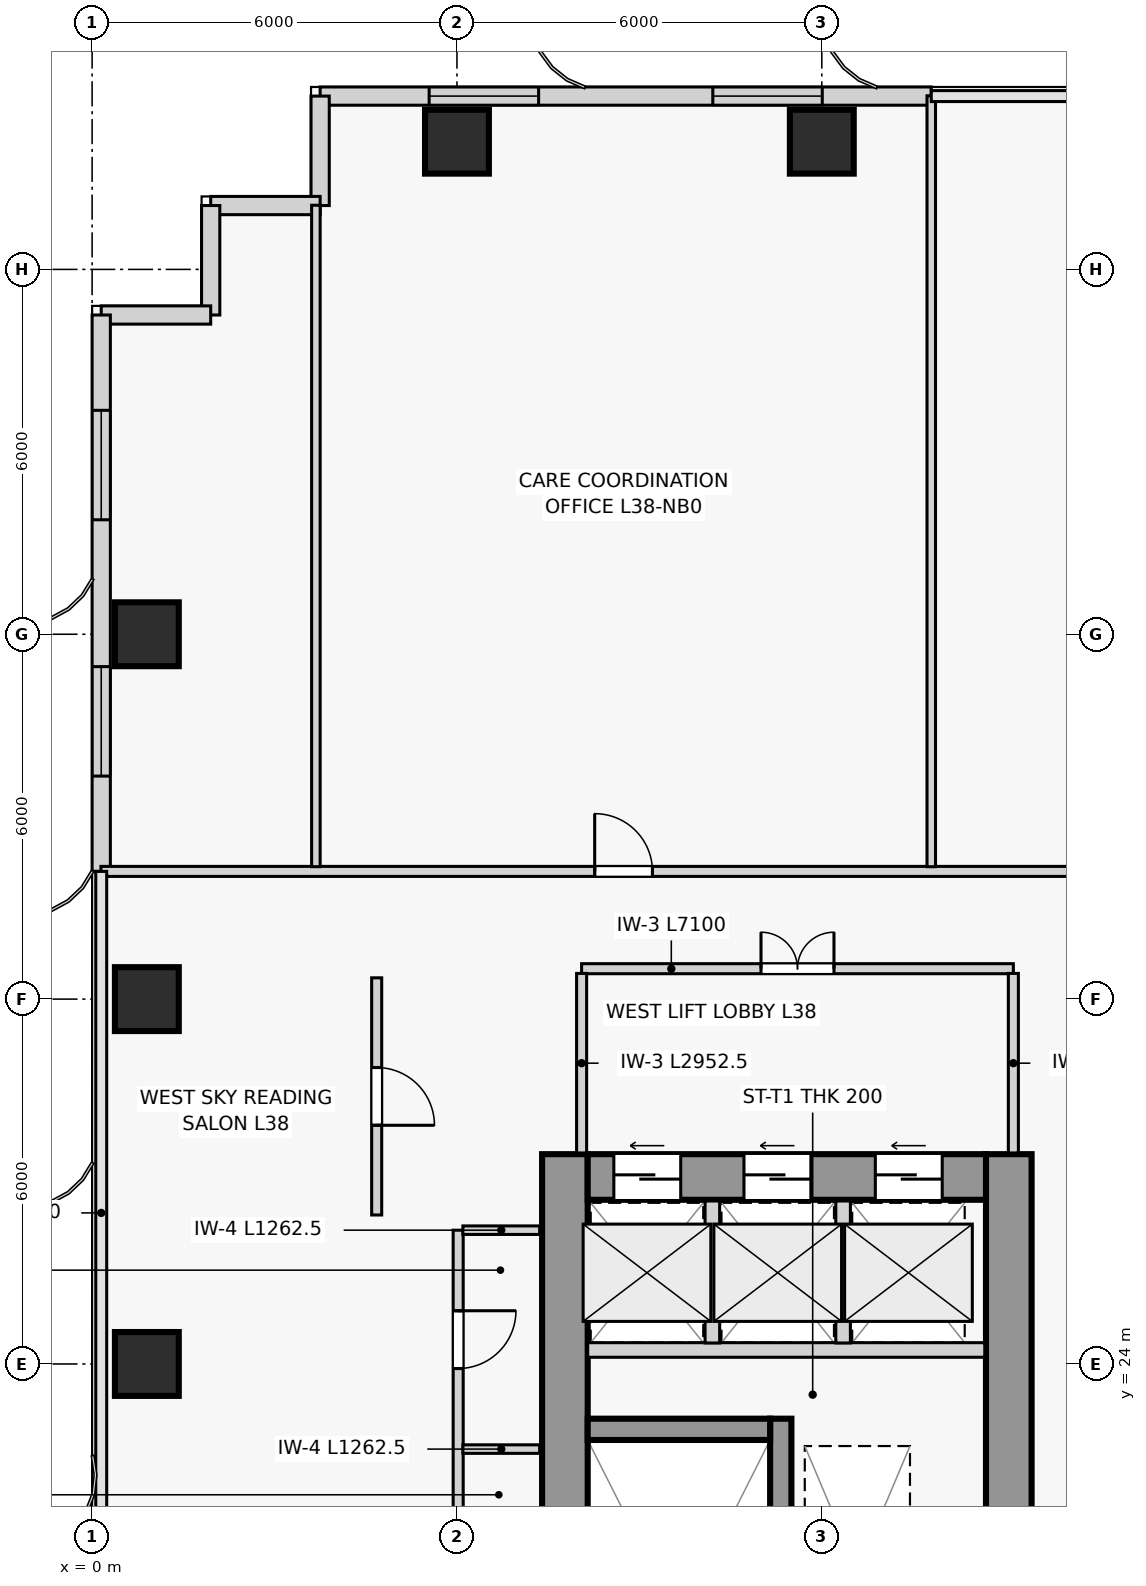
"""IFC4 building model, lengths in metres.
Left out: names, types, materials, properties, quantities, classifications, styles, units other than length and angle.
Written with IfcOpenShell. Run it as: python <this file> out.ifc"""

import sys

from ifc_helpers import new_model, si_unit, direction, frame, frame_2d, origin, origin_2d, place, context, subcontext, project, spatial, rectangle, extrude, source, transform, mapped, element, fill, save


model = new_model("IFC4")
c1 = context("Model", 3, precision=1e-05, world=origin(), true_north=direction((0.0, 1.0)))
c2 = subcontext(c1, "Body", "Model", "MODEL_VIEW")
j1 = project(units=[si_unit("LENGTHUNIT", "METRE"), si_unit("PLANEANGLEUNIT", "RADIAN")], contexts=[c1])
p1 = place(None, origin())
s1 = spatial("IfcSite", under=j1, at=p1, CompositionType="ELEMENT")
p2 = place(p1, origin())
s2 = spatial("IfcBuilding", under=s1, at=p2, CompositionType="ELEMENT")
p3 = place(p2, frame((0.0, 0.0, 144.9)))
s3 = spatial("IfcBuildingStorey", under=s2, at=p3, CompositionType="ELEMENT", Elevation=144.9)
p4 = place(p3, frame((7.775, 14.6, 0.0), z_axis=(0.0, 0.0, 1.0), x_axis=(0.0, 1.0, 0.0)))
e1 = element("IfcWall", 1, at=p4, inside=s3, PredefinedType="SHEAR", context=c2, shape_type="SweptSolid", body=[
    extrude(rectangle(XDim=12.85, YDim=0.75, at=frame_2d((6.425, 0.0))), origin(), (0.0, 0.0, 1.0), 3.6),
])
p5 = place(p3, frame((15.075, 14.6, 0.0), z_axis=(0.0, 0.0, 1.0), x_axis=(0.0, 1.0, 0.0)))
e2 = element("IfcWall", 2, at=p5, inside=s3, PredefinedType="SHEAR", context=c2, shape_type="SweptSolid", body=[
    extrude(rectangle(XDim=12.85, YDim=0.75, at=frame_2d((6.425, 0.0))), origin(), (0.0, 0.0, 1.0), 3.6),
])
p6 = place(p5, frame((5.5, 0.0, 0.0)))
e3 = element("IfcOpeningElement", 3, at=p6, cuts=e2, PredefinedType="OPENING", context=c2, shape_type="SweptSolid", body=[
    extrude(rectangle(XDim=1.1, YDim=2.2, at=frame_2d((0.55, 1.1))), frame((0.0, 0.385, 0.0), z_axis=(0.0, -1.0, 0.0), x_axis=(1.0, 0.0, 0.0)), (0.0, 0.0, 1.0), 0.77),
])
p7 = place(p3, frame((8.15, 27.075, 0.0), z_axis=(0.0, 0.0, 1.0), x_axis=(1.0, 0.0, 0.0)))
e4 = element("IfcWall", 4, at=p7, inside=s3, PredefinedType="SHEAR", context=c2, shape_type="SweptSolid", body=[
    extrude(rectangle(XDim=6.55, YDim=0.75, at=frame_2d((3.275, 0.0))), origin(), (0.0, 0.0, 1.0), 3.6),
])
p8 = place(p7, frame((0.43, 0.0, 0.0)))
e5 = element("IfcOpeningElement", 5, at=p8, cuts=e4, PredefinedType="OPENING", context=c2, shape_type="SweptSolid", body=[
    extrude(rectangle(XDim=1.1, YDim=2.2, at=frame_2d((0.55, 1.1))), frame((0.0, 0.385, 0.0), z_axis=(0.0, -1.0, 0.0), x_axis=(1.0, 0.0, 0.0)), (0.0, 0.0, 1.0), 0.77),
])
p9 = place(p7, frame((2.57, 0.0, 0.0)))
e6 = element("IfcOpeningElement", 6, at=p9, cuts=e4, PredefinedType="OPENING", context=c2, shape_type="SweptSolid", body=[
    extrude(rectangle(XDim=1.1, YDim=2.2, at=frame_2d((0.55, 1.1))), frame((0.0, 0.385, 0.0), z_axis=(0.0, -1.0, 0.0), x_axis=(1.0, 0.0, 0.0)), (0.0, 0.0, 1.0), 0.77),
])
p10 = place(p7, frame((4.73, 0.0, 0.0)))
e7 = element("IfcOpeningElement", 7, at=p10, cuts=e4, PredefinedType="OPENING", context=c2, shape_type="SweptSolid", body=[
    extrude(rectangle(XDim=1.1, YDim=2.2, at=frame_2d((0.55, 1.1))), frame((0.0, 0.385, 0.0), z_axis=(0.0, -1.0, 0.0), x_axis=(1.0, 0.0, 0.0)), (0.0, 0.0, 1.0), 0.77),
])
p11 = place(p3, frame((11.325, 15.35, 0.0), z_axis=(0.0, 0.0, 1.0), x_axis=(0.0, 1.0, 0.0)))
e8 = element("IfcWall", 8, at=p11, inside=s3, PredefinedType="SHEAR", context=c2, shape_type="SweptSolid", body=[
    extrude(rectangle(XDim=7.75, YDim=0.35, at=frame_2d((3.875, 0.0))), origin(), (0.0, 0.0, 1.0), 3.6),
])
p12 = place(p3, frame((8.15, 22.925, 0.0), z_axis=(0.0, 0.0, 1.0), x_axis=(1.0, 0.0, 0.0)))
e9 = element("IfcWall", 9, at=p12, inside=s3, PredefinedType="SHEAR", context=c2, shape_type="SweptSolid", body=[
    extrude(rectangle(XDim=3.0, YDim=0.35, at=frame_2d((1.5, 0.0))), origin(), (0.0, 0.0, 1.0), 3.6),
])
m1 = source(origin(), c2, "Body", "SweptSolid", [
    extrude(rectangle(XDim=1.05, YDim=1.05, at=origin_2d()), origin(), (0.0, 0.0, 1.0), 3.6),
])
for number, where, z_axis, x_axis in (
    (10, (6.0, 44.1, 0.0), (0.0, 0.0, 1.0), (1.0, 0.0, 0.0)),
    (11, (12.0, 44.1, 0.0), (0.0, 0.0, 1.0), (1.0, 0.0, 0.0)),
    (12, (0.9, 24.0, 0.0), (0.0, 0.0, 1.0), (1.0, 0.0, 0.0)),
    (13, (0.9, 30.0, 0.0), (0.0, 0.0, 1.0), (1.0, 0.0, 0.0)),
    (14, (0.9, 36.0, 0.0), (0.0, 0.0, 1.0), (1.0, 0.0, 0.0)),
):
    element("IfcColumn", number, at=place(p3, frame(where, z_axis=z_axis, x_axis=x_axis)), inside=s3, PredefinedType="COLUMN", context=c2, shape_type="MappedRepresentation", body=[
        mapped(m1, transform((0.0, 0.0, 0.0), scale=1.0)),
    ])
p13 = place(p3, frame((13.8, 44.85, 0.0), z_axis=(0.0, 0.0, 1.0), x_axis=(-1.0, 0.0, 0.0)))
e15 = element("IfcWall", 15, at=p13, inside=s3, PredefinedType="SOLIDWALL", context=c2, shape_type="SweptSolid", body=[
    extrude(rectangle(XDim=10.05, YDim=0.3, at=frame_2d((5.025, 0.0))), origin(), (0.0, 0.0, 1.0), 3.28),
])
p14 = place(p13, frame((1.792, 0.0, 0.8)))
e16 = element("IfcOpeningElement", 16, at=p14, cuts=e15, PredefinedType="OPENING", context=c2, shape_type="SweptSolid", body=[
    extrude(rectangle(XDim=1.8, YDim=2.1, at=frame_2d((0.9, 1.05))), frame((0.0, 0.16, 0.0), z_axis=(0.0, -1.0, 0.0), x_axis=(1.0, 0.0, 0.0)), (0.0, 0.0, 1.0), 0.32),
])
p15 = place(p13, frame((6.458, 0.0, 0.8)))
e17 = element("IfcOpeningElement", 17, at=p15, cuts=e15, PredefinedType="OPENING", context=c2, shape_type="SweptSolid", body=[
    extrude(rectangle(XDim=1.8, YDim=2.1, at=frame_2d((0.9, 1.05))), frame((0.0, 0.16, 0.0), z_axis=(0.0, -1.0, 0.0), x_axis=(1.0, 0.0, 0.0)), (0.0, 0.0, 1.0), 0.32),
])
for number, where, z_axis, x_axis in (
    (18, (3.75, 44.85, 0.0), (0.0, 0.0, 1.0), (0.0, -1.0, 0.0)),
    (19, (3.75, 43.05, 0.0), (0.0, 0.0, 1.0), (-1.0, 0.0, 0.0)),
    (20, (1.95, 43.05, 0.0), (0.0, 0.0, 1.0), (0.0, -1.0, 0.0)),
    (21, (1.95, 41.25, 0.0), (0.0, 0.0, 1.0), (-1.0, 0.0, 0.0)),
):
    element("IfcWall", number, at=place(p3, frame(where, z_axis=z_axis, x_axis=x_axis)), inside=s3, PredefinedType="SOLIDWALL", context=c2, shape_type="SweptSolid", body=[
        extrude(rectangle(XDim=1.8, YDim=0.3, at=frame_2d((0.9, 0.0))), origin(), (0.0, 0.0, 1.0), 3.28),
    ])
p16 = place(p3, frame((0.15, 41.25, 0.0), z_axis=(0.0, 0.0, 1.0), x_axis=(0.0, -1.0, 0.0)))
e22 = element("IfcWall", 22, at=p16, inside=s3, PredefinedType="SOLIDWALL", context=c2, shape_type="SweptSolid", body=[
    extrude(rectangle(XDim=9.15, YDim=0.3, at=frame_2d((4.575, 0.0))), origin(), (0.0, 0.0, 1.0), 3.28),
])
p17 = place(p16, frame((1.567, 0.0, 0.8)))
e23 = element("IfcOpeningElement", 23, at=p17, cuts=e22, PredefinedType="OPENING", context=c2, shape_type="SweptSolid", body=[
    extrude(rectangle(XDim=1.8, YDim=2.1, at=frame_2d((0.9, 1.05))), frame((0.0, 0.16, 0.0), z_axis=(0.0, -1.0, 0.0), x_axis=(1.0, 0.0, 0.0)), (0.0, 0.0, 1.0), 0.32),
])
p18 = place(p16, frame((5.782, 0.0, 0.8)))
e24 = element("IfcOpeningElement", 24, at=p18, cuts=e22, PredefinedType="OPENING", context=c2, shape_type="SweptSolid", body=[
    extrude(rectangle(XDim=1.8, YDim=2.1, at=frame_2d((0.9, 1.05))), frame((0.0, 0.16, 0.0), z_axis=(0.0, -1.0, 0.0), x_axis=(1.0, 0.0, 0.0)), (0.0, 0.0, 1.0), 0.32),
])
p19 = place(p3, frame((8.15, 24.23, 0.0), z_axis=(0.0, 0.0, 1.0), x_axis=(1.0, 0.0, 0.0)))
e25 = element("IfcWall", 25, at=p19, inside=s3, PredefinedType="PARTITIONING", context=c2, shape_type="SweptSolid", body=[
    extrude(rectangle(XDim=6.53, YDim=0.24, at=frame_2d((3.265, 0.0))), origin(), (0.0, 0.0, 1.0), 3.28),
])
for number, where, z_axis, x_axis in (
    (26, (10.2, 24.345, 0.0), (0.0, 0.0, 1.0), (0.0, 1.0, 0.0)),
    (27, (12.35, 24.345, 0.0), (0.0, 0.0, 1.0), (0.0, 1.0, 0.0)),
):
    element("IfcWall", number, at=place(p3, frame(where, z_axis=z_axis, x_axis=x_axis)), inside=s3, PredefinedType="PARTITIONING", context=c2, shape_type="SweptSolid", body=[
        extrude(rectangle(XDim=2.335, YDim=0.24, at=frame_2d((1.167, 0.0))), origin(), (0.0, 0.0, 1.0), 3.28),
    ])
p20 = place(p3, frame((8.05, 30.5, 0.0), z_axis=(0.0, 0.0, 1.0), x_axis=(1.0, 0.0, 0.0)))
e28 = element("IfcWall", 28, at=p20, inside=s3, PredefinedType="PARTITIONING", context=c2, shape_type="SweptSolid", body=[
    extrude(rectangle(XDim=7.1, YDim=0.165, at=frame_2d((3.55, 0.0))), origin(), (0.0, 0.0, 1.0), 3.28),
])
p21 = place(p20, frame((2.95, 0.0, 0.0)))
e29 = element("IfcOpeningElement", 29, at=p21, cuts=e28, PredefinedType="OPENING", context=c2, shape_type="SweptSolid", body=[
    extrude(rectangle(XDim=1.2, YDim=2.2, at=frame_2d((0.6, 1.1))), frame((0.0, 0.093, 0.0), z_axis=(0.0, -1.0, 0.0), x_axis=(1.0, 0.0, 0.0)), (0.0, 0.0, 1.0), 0.185),
])
for number, where, z_axis, x_axis in (
    (30, (8.05, 27.47, 0.0), (0.0, 0.0, 1.0), (0.0, 1.0, 0.0)),
    (31, (15.15, 27.47, 0.0), (0.0, 0.0, 1.0), (0.0, 1.0, 0.0)),
):
    element("IfcWall", number, at=place(p3, frame(where, z_axis=z_axis, x_axis=x_axis)), inside=s3, PredefinedType="PARTITIONING", context=c2, shape_type="SweptSolid", body=[
        extrude(rectangle(XDim=2.953, YDim=0.165, at=frame_2d((1.476, 0.0))), origin(), (0.0, 0.0, 1.0), 3.28),
    ])
p22 = place(p3, frame((6.02, 15.4, 0.0), z_axis=(0.0, 0.0, 1.0), x_axis=(0.0, 1.0, 0.0)))
e32 = element("IfcWall", 32, at=p22, inside=s3, PredefinedType="PARTITIONING", context=c2, shape_type="SweptSolid", body=[
    extrude(rectangle(XDim=10.8, YDim=0.165, at=frame_2d((5.4, 0.0))), origin(), (0.0, 0.0, 1.0), 3.28),
])
p23 = place(p22, frame((1.225, 0.0, 0.0)))
e33 = element("IfcOpeningElement", 33, at=p23, cuts=e32, PredefinedType="OPENING", context=c2, shape_type="SweptSolid", body=[
    extrude(rectangle(XDim=0.95, YDim=2.1, at=frame_2d((0.475, 1.05))), frame((0.0, 0.093, 0.0), z_axis=(0.0, -1.0, 0.0), x_axis=(1.0, 0.0, 0.0)), (0.0, 0.0, 1.0), 0.185),
])
p24 = place(p22, frame((4.85, 0.0, 0.0)))
e34 = element("IfcOpeningElement", 34, at=p24, cuts=e32, PredefinedType="OPENING", context=c2, shape_type="SweptSolid", body=[
    extrude(rectangle(XDim=0.9, YDim=2.1, at=frame_2d((0.45, 1.05))), frame((0.0, 0.093, 0.0), z_axis=(0.0, -1.0, 0.0), x_axis=(1.0, 0.0, 0.0)), (0.0, 0.0, 1.0), 0.185),
])
p25 = place(p22, frame((8.525, 0.0, 0.0)))
e35 = element("IfcOpeningElement", 35, at=p25, cuts=e32, PredefinedType="OPENING", context=c2, shape_type="SweptSolid", body=[
    extrude(rectangle(XDim=0.95, YDim=2.1, at=frame_2d((0.475, 1.05))), frame((0.0, 0.093, 0.0), z_axis=(0.0, -1.0, 0.0), x_axis=(1.0, 0.0, 0.0)), (0.0, 0.0, 1.0), 0.185),
])
for number, where, z_axis, x_axis in (
    (36, (6.097, 26.2, 0.0), (0.0, 0.0, 1.0), (1.0, 0.0, 0.0)),
    (37, (6.097, 22.6, 0.0), (0.0, 0.0, 1.0), (1.0, 0.0, 0.0)),
):
    element("IfcWall", number, at=place(p3, frame(where, z_axis=z_axis, x_axis=x_axis)), inside=s3, PredefinedType="PARTITIONING", context=c2, shape_type="SweptSolid", body=[
        extrude(rectangle(XDim=1.263, YDim=0.14, at=frame_2d((0.631, 0.0))), origin(), (0.0, 0.0, 1.0), 3.28),
    ])
p26 = place(p3, frame((0.145, 32.1, 0.0), z_axis=(0.0, 0.0, 1.0), x_axis=(1.0, 0.0, 0.0)))
e38 = element("IfcWall", 38, at=p26, inside=s3, PredefinedType="PARTITIONING", context=c2, shape_type="SweptSolid", body=[
    extrude(rectangle(XDim=44.71, YDim=0.165, at=frame_2d((22.355, 0.0))), origin(), (0.0, 0.0, 1.0), 3.28),
])
p27 = place(p26, frame((8.12, 0.0, 0.0)))
e39 = element("IfcOpeningElement", 39, at=p27, cuts=e38, PredefinedType="OPENING", context=c2, shape_type="SweptSolid", body=[
    extrude(rectangle(XDim=0.95, YDim=2.1, at=frame_2d((0.475, 1.05))), frame((0.0, 0.093, 0.0), z_axis=(0.0, -1.0, 0.0), x_axis=(1.0, 0.0, 0.0)), (0.0, 0.0, 1.0), 0.185),
])
p28 = place(p26, frame((18.48, 0.0, 0.0)))
e40 = element("IfcOpeningElement", 40, at=p28, cuts=e38, PredefinedType="OPENING", context=c2, shape_type="SweptSolid", body=[
    extrude(rectangle(XDim=0.95, YDim=2.1, at=frame_2d((0.475, 1.05))), frame((0.0, 0.093, 0.0), z_axis=(0.0, -1.0, 0.0), x_axis=(1.0, 0.0, 0.0)), (0.0, 0.0, 1.0), 0.185),
])
p29 = place(p26, frame((28.13, 0.0, 0.0)))
e41 = element("IfcOpeningElement", 41, at=p29, cuts=e38, PredefinedType="OPENING", context=c2, shape_type="SweptSolid", body=[
    extrude(rectangle(XDim=1.25, YDim=2.2, at=frame_2d((0.625, 1.1))), frame((0.0, 0.093, 0.0), z_axis=(0.0, -1.0, 0.0), x_axis=(1.0, 0.0, 0.0)), (0.0, 0.0, 1.0), 0.185),
])
p30 = place(p26, frame((36.59, 0.0, 0.0)))
e42 = element("IfcOpeningElement", 42, at=p30, cuts=e38, PredefinedType="OPENING", context=c2, shape_type="SweptSolid", body=[
    extrude(rectangle(XDim=1.25, YDim=2.2, at=frame_2d((0.625, 1.1))), frame((0.0, 0.093, 0.0), z_axis=(0.0, -1.0, 0.0), x_axis=(1.0, 0.0, 0.0)), (0.0, 0.0, 1.0), 0.185),
])
p31 = place(p3, frame((4.68, 26.45, 0.0), z_axis=(0.0, 0.0, 1.0), x_axis=(0.0, 1.0, 0.0)))
e43 = element("IfcWall", 43, at=p31, inside=s3, PredefinedType="PARTITIONING", context=c2, shape_type="SweptSolid", body=[
    extrude(rectangle(XDim=3.9, YDim=0.165, at=frame_2d((1.95, 0.0))), origin(), (0.0, 0.0, 1.0), 3.28),
])
p32 = place(p31, frame((1.475, 0.0, 0.0)))
e44 = element("IfcOpeningElement", 44, at=p32, cuts=e43, PredefinedType="OPENING", context=c2, shape_type="SweptSolid", body=[
    extrude(rectangle(XDim=0.95, YDim=2.1, at=frame_2d((0.475, 1.05))), frame((0.0, 0.093, 0.0), z_axis=(0.0, -1.0, 0.0), x_axis=(1.0, 0.0, 0.0)), (0.0, 0.0, 1.0), 0.185),
])
p33 = place(p3, frame((3.68, 32.177, 0.0), z_axis=(0.0, 0.0, 1.0), x_axis=(0.0, 1.0, 0.0)))
e45 = element("IfcWall", 45, at=p33, inside=s3, PredefinedType="PARTITIONING", context=c2, shape_type="SweptSolid", body=[
    extrude(rectangle(XDim=10.877, YDim=0.14, at=frame_2d((5.439, 0.0))), origin(), (0.0, 0.0, 1.0), 3.28),
])
p34 = place(p3, frame((13.8, 32.177, 0.0), z_axis=(0.0, 0.0, 1.0), x_axis=(0.0, 1.0, 0.0)))
e46 = element("IfcWall", 46, at=p34, inside=s3, PredefinedType="PARTITIONING", context=c2, shape_type="SweptSolid", body=[
    extrude(rectangle(XDim=12.677, YDim=0.14, at=frame_2d((6.339, 0.0))), origin(), (0.0, 0.0, 1.0), 3.28),
])
m2 = source(origin(), c2, "Body", "SweptSolid", [
    extrude(rectangle(XDim=1.8, YDim=2.1, at=frame_2d((0.9, 1.05))), frame((0.0, 0.03, 0.0), z_axis=(0.0, -1.0, 0.0), x_axis=(1.0, 0.0, 0.0)), (0.0, 0.0, 1.0), 0.06),
])
p35 = place(p14, origin())
e47 = element("IfcWindow", 47, at=p35, inside=s3, PartitioningType="SINGLE_PANEL", PredefinedType="WINDOW", context=c2, shape_type="MappedRepresentation", body=[
    mapped(m2, transform((0.0, 0.0, 0.0), scale=1.0)),
])
fill(e16, e47)
p36 = place(p15, origin())
e48 = element("IfcWindow", 48, at=p36, inside=s3, PartitioningType="SINGLE_PANEL", PredefinedType="WINDOW", context=c2, shape_type="MappedRepresentation", body=[
    mapped(m2, transform((0.0, 0.0, 0.0), scale=1.0)),
])
fill(e17, e48)
p37 = place(p17, origin())
e49 = element("IfcWindow", 49, at=p37, inside=s3, PartitioningType="SINGLE_PANEL", PredefinedType="WINDOW", context=c2, shape_type="MappedRepresentation", body=[
    mapped(m2, transform((0.0, 0.0, 0.0), scale=1.0)),
])
fill(e23, e49)
p38 = place(p18, origin())
e50 = element("IfcWindow", 50, at=p38, inside=s3, PartitioningType="SINGLE_PANEL", PredefinedType="WINDOW", context=c2, shape_type="MappedRepresentation", body=[
    mapped(m2, transform((0.0, 0.0, 0.0), scale=1.0)),
])
fill(e24, e50)
m3 = source(origin(), c2, "Body", "SweptSolid", [
    extrude(rectangle(XDim=1.1, YDim=2.2, at=frame_2d((0.55, 1.1))), frame((0.0, 0.025, 0.0), z_axis=(0.0, -1.0, 0.0), x_axis=(1.0, 0.0, 0.0)), (0.0, 0.0, 1.0), 0.05),
])
p39 = place(p8, origin())
e51 = element("IfcDoor", 51, at=p39, inside=s3, OperationType="SLIDING_TO_LEFT", PredefinedType="DOOR", context=c2, shape_type="MappedRepresentation", body=[
    mapped(m3, transform((0.0, 0.0, 0.0), scale=1.0)),
])
fill(e5, e51)
p40 = place(p9, origin())
e52 = element("IfcDoor", 52, at=p40, inside=s3, OperationType="SLIDING_TO_LEFT", PredefinedType="DOOR", context=c2, shape_type="MappedRepresentation", body=[
    mapped(m3, transform((0.0, 0.0, 0.0), scale=1.0)),
])
fill(e6, e52)
p41 = place(p10, origin())
e53 = element("IfcDoor", 53, at=p41, inside=s3, OperationType="SLIDING_TO_LEFT", PredefinedType="DOOR", context=c2, shape_type="MappedRepresentation", body=[
    mapped(m3, transform((0.0, 0.0, 0.0), scale=1.0)),
])
fill(e7, e53)
m4 = source(origin(), c2, "Body", "SweptSolid", [
    extrude(rectangle(XDim=1.2, YDim=2.2, at=frame_2d((0.6, 1.1))), frame((0.0, 0.025, 0.0), z_axis=(0.0, -1.0, 0.0), x_axis=(1.0, 0.0, 0.0)), (0.0, 0.0, 1.0), 0.05),
])
p42 = place(p21, origin())
e54 = element("IfcDoor", 54, at=p42, inside=s3, OperationType="DOUBLE_DOOR_SINGLE_SWING", PredefinedType="DOOR", context=c2, shape_type="MappedRepresentation", body=[
    mapped(m4, transform((0.0, 0.0, 0.0), scale=1.0)),
])
fill(e29, e54)
m5 = source(origin(), c2, "Body", "SweptSolid", [
    extrude(rectangle(XDim=0.95, YDim=2.1, at=frame_2d((0.475, 1.05))), frame((0.0, 0.025, 0.0), z_axis=(0.0, -1.0, 0.0), x_axis=(1.0, 0.0, 0.0)), (0.0, 0.0, 1.0), 0.05),
])
p43 = place(p25, frame((0.95, 0.0, 0.0), z_axis=(0.0, 0.0, 1.0), x_axis=(-1.0, 0.0, 0.0)))
e55 = element("IfcDoor", 55, at=p43, inside=s3, OperationType="SINGLE_SWING_LEFT", PredefinedType="DOOR", context=c2, shape_type="MappedRepresentation", body=[
    mapped(m5, transform((0.0, 0.0, 0.0), scale=1.0)),
])
fill(e35, e55)
p44 = place(p32, frame((0.95, 0.0, 0.0), z_axis=(0.0, 0.0, 1.0), x_axis=(-1.0, 0.0, 0.0)))
e56 = element("IfcDoor", 56, at=p44, inside=s3, OperationType="SINGLE_SWING_RIGHT", PredefinedType="DOOR", context=c2, shape_type="MappedRepresentation", body=[
    mapped(m5, transform((0.0, 0.0, 0.0), scale=1.0)),
])
fill(e44, e56)
p45 = place(p27, origin())
e57 = element("IfcDoor", 57, at=p45, inside=s3, OperationType="SINGLE_SWING_LEFT", PredefinedType="DOOR", context=c2, shape_type="MappedRepresentation", body=[
    mapped(m5, transform((0.0, 0.0, 0.0), scale=1.0)),
])
fill(e39, e57)
save(model, sys.argv[1])
